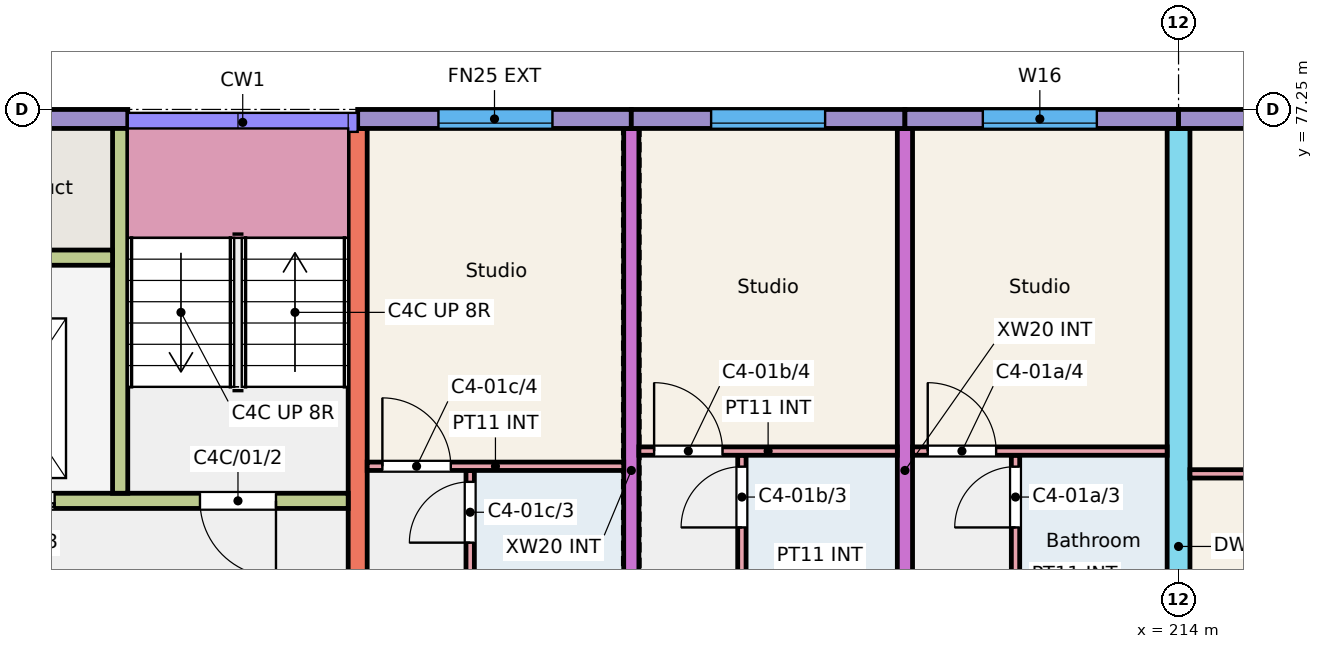
"""IFC4 building model, lengths in metres.
Left out: names, types, materials, properties, quantities, classifications, styles, units other than length and angle.
Written with IfcOpenShell. Run it as: python <this file> out.ifc"""

import sys

from ifc_helpers import new_model, si_unit, direction, frame, frame_2d, origin, place, context, subcontext, project, spatial, rectangle, extrude, element, fill, save


model = new_model("IFC4")
c1 = context("Model", 3, precision=1e-05, world=origin(), true_north=direction((0.0, 1.0)))
c2 = subcontext(c1, "Body", "Model", "MODEL_VIEW")
j1 = project(units=[si_unit("LENGTHUNIT", "METRE"), si_unit("PLANEANGLEUNIT", "RADIAN")], contexts=[c1])
p1 = place(None, origin())
s1 = spatial("IfcSite", under=j1, at=p1, CompositionType="ELEMENT")
p2 = place(p1, origin())
s2 = spatial("IfcBuilding", under=s1, at=p2, CompositionType="ELEMENT")
p3 = place(p2, frame((0.0, 0.0, 3.0)))
s3 = spatial("IfcBuildingStorey", under=s2, at=p3, CompositionType="ELEMENT", Elevation=3.0)
p4 = place(p3, frame((203.2, 68.0, 0.0), z_axis=(0.0, 0.0, 1.0), x_axis=(0.0, 1.0, 0.0)))
e1 = element("IfcWall", 1, at=p4, inside=s3, PredefinedType="SHEAR", context=c2, shape_type="SweptSolid", body=[
    extrude(rectangle(XDim=9.0, YDim=0.25, at=frame_2d((4.5, 0.0))), origin(), (0.0, 0.0, 1.0), 3.0),
])
for number, where, z_axis, x_axis in (
    (2, (206.8, 68.0, 0.0), (0.0, 0.0, 1.0), (0.0, 1.0, 0.0)),
    (3, (210.4, 68.0, 0.0), (0.0, 0.0, 1.0), (0.0, 1.0, 0.0)),
):
    element("IfcWall", number, at=place(p3, frame(where, z_axis=z_axis, x_axis=x_axis)), inside=s3, PredefinedType="SHEAR", context=c2, shape_type="SweptSolid", body=[
        extrude(rectangle(XDim=9.0, YDim=0.2, at=frame_2d((4.5, 0.0))), origin(), (0.0, 0.0, 1.0), 3.0),
    ])
p5 = place(p3, frame((214.0, 66.0, 0.0), z_axis=(0.0, 0.0, 1.0), x_axis=(0.0, 1.0, 0.0)))
e4 = element("IfcWall", 4, at=p5, inside=s3, PredefinedType="SHEAR", context=c2, shape_type="SweptSolid", body=[
    extrude(rectangle(XDim=11.0, YDim=0.3, at=frame_2d((5.5, 0.0))), origin(), (0.0, 0.0, 1.0), 3.0),
])
p6 = place(p5, frame((0.3, 0.0, 0.0)))
e5 = element("IfcOpeningElement", 5, at=p6, cuts=e4, PredefinedType="OPENING", context=c2, shape_type="SweptSolid", body=[
    extrude(rectangle(XDim=1.2, YDim=2.1, at=frame_2d((0.6, 1.05))), frame((0.0, 0.16, 0.0), z_axis=(0.0, -1.0, 0.0), x_axis=(1.0, 0.0, 0.0)), (0.0, 0.0, 1.0), 0.32),
])
p7 = place(p3, frame((197.2, 77.125, 0.0), z_axis=(0.0, 0.0, 1.0), x_axis=(1.0, 0.0, 0.0)))
e6 = element("IfcWall", 6, at=p7, inside=s3, PredefinedType="SOLIDWALL", context=c2, shape_type="SweptSolid", body=[
    extrude(rectangle(XDim=2.975, YDim=0.25, at=frame_2d((1.488, 0.0))), origin(), (0.0, 0.0, 1.0), 3.0),
])
p8 = place(p3, frame((197.35, 72.1, 0.0), z_axis=(0.0, 0.0, 1.0), x_axis=(1.0, 0.0, 0.0)))
e7 = element("IfcWall", 7, at=p8, inside=s3, PredefinedType="SHEAR", context=c2, shape_type="SweptSolid", body=[
    extrude(rectangle(XDim=5.725, YDim=0.2, at=frame_2d((2.862, 0.0))), origin(), (0.0, 0.0, 1.0), 3.0),
])
p9 = place(p8, frame((3.775, 0.0, 0.0)))
e8 = element("IfcOpeningElement", 8, at=p9, cuts=e7, PredefinedType="OPENING", context=c2, shape_type="SweptSolid", body=[
    extrude(rectangle(XDim=1.0, YDim=2.1, at=frame_2d((0.5, 1.05))), frame((0.0, 0.11, 0.0), z_axis=(0.0, -1.0, 0.0), x_axis=(1.0, 0.0, 0.0)), (0.0, 0.0, 1.0), 0.22),
])
p10 = place(p8, frame((0.762, 0.0, 0.0)))
e9 = element("IfcOpeningElement", 9, at=p10, cuts=e7, PredefinedType="OPENING", context=c2, shape_type="SweptSolid", body=[
    extrude(rectangle(XDim=1.1, YDim=2.1, at=frame_2d((0.55, 1.05))), frame((0.0, 0.11, 0.0), z_axis=(0.0, -1.0, 0.0), x_axis=(1.0, 0.0, 0.0)), (0.0, 0.0, 1.0), 0.22),
])
p11 = place(p3, frame((200.075, 72.2, 0.0), z_axis=(0.0, 0.0, 1.0), x_axis=(0.0, 1.0, 0.0)))
e10 = element("IfcWall", 10, at=p11, inside=s3, PredefinedType="SHEAR", context=c2, shape_type="SweptSolid", body=[
    extrude(rectangle(XDim=4.8, YDim=0.2, at=frame_2d((2.4, 0.0))), origin(), (0.0, 0.0, 1.0), 3.0),
])
p12 = place(p3, frame((197.35, 75.3, 0.0), z_axis=(0.0, 0.0, 1.0), x_axis=(1.0, 0.0, 0.0)))
e11 = element("IfcWall", 11, at=p12, inside=s3, PredefinedType="SHEAR", context=c2, shape_type="SweptSolid", body=[
    extrude(rectangle(XDim=2.625, YDim=0.2, at=frame_2d((1.312, 0.0))), origin(), (0.0, 0.0, 1.0), 3.0),
])
p13 = place(p3, frame((203.2, 77.125, 0.0), z_axis=(0.0, 0.0, 1.0), x_axis=(1.0, 0.0, 0.0)))
e12 = element("IfcWall", 12, at=p13, inside=s3, PredefinedType="SOLIDWALL", context=c2, shape_type="SweptSolid", body=[
    extrude(rectangle(XDim=3.6, YDim=0.25, at=frame_2d((1.8, 0.0))), origin(), (0.0, 0.0, 1.0), 3.0),
])
p14 = place(p13, frame((1.062, 0.0, 0.9)))
e13 = element("IfcOpeningElement", 13, at=p14, cuts=e12, PredefinedType="OPENING", context=c2, shape_type="SweptSolid", body=[
    extrude(rectangle(XDim=1.5, YDim=1.5, at=frame_2d((0.75, 0.75))), frame((0.0, 0.135, 0.0), z_axis=(0.0, -1.0, 0.0), x_axis=(1.0, 0.0, 0.0)), (0.0, 0.0, 1.0), 0.27),
])
p15 = place(p3, frame((206.8, 77.125, 0.0), z_axis=(0.0, 0.0, 1.0), x_axis=(1.0, 0.0, 0.0)))
e14 = element("IfcWall", 14, at=p15, inside=s3, PredefinedType="SOLIDWALL", context=c2, shape_type="SweptSolid", body=[
    extrude(rectangle(XDim=3.6, YDim=0.25, at=frame_2d((1.8, 0.0))), origin(), (0.0, 0.0, 1.0), 3.0),
])
p16 = place(p15, frame((1.05, 0.0, 0.9)))
e15 = element("IfcOpeningElement", 15, at=p16, cuts=e14, PredefinedType="OPENING", context=c2, shape_type="SweptSolid", body=[
    extrude(rectangle(XDim=1.5, YDim=1.5, at=frame_2d((0.75, 0.75))), frame((0.0, 0.135, 0.0), z_axis=(0.0, -1.0, 0.0), x_axis=(1.0, 0.0, 0.0)), (0.0, 0.0, 1.0), 0.27),
])
p17 = place(p3, frame((210.4, 77.125, 0.0), z_axis=(0.0, 0.0, 1.0), x_axis=(1.0, 0.0, 0.0)))
e16 = element("IfcWall", 16, at=p17, inside=s3, PredefinedType="SOLIDWALL", context=c2, shape_type="SweptSolid", body=[
    extrude(rectangle(XDim=3.6, YDim=0.25, at=frame_2d((1.8, 0.0))), origin(), (0.0, 0.0, 1.0), 3.0),
])
p18 = place(p17, frame((1.025, 0.0, 0.9)))
e17 = element("IfcOpeningElement", 17, at=p18, cuts=e16, PredefinedType="OPENING", context=c2, shape_type="SweptSolid", body=[
    extrude(rectangle(XDim=1.5, YDim=1.5, at=frame_2d((0.75, 0.75))), frame((0.0, 0.135, 0.0), z_axis=(0.0, -1.0, 0.0), x_axis=(1.0, 0.0, 0.0)), (0.0, 0.0, 1.0), 0.27),
])
p19 = place(p3, frame((214.0, 77.125, 0.0), z_axis=(0.0, 0.0, 1.0), x_axis=(1.0, 0.0, 0.0)))
e18 = element("IfcWall", 18, at=p19, inside=s3, PredefinedType="SOLIDWALL", context=c2, shape_type="SweptSolid", body=[
    extrude(rectangle(XDim=3.6, YDim=0.25, at=frame_2d((1.8, 0.0))), origin(), (0.0, 0.0, 1.0), 3.0),
])
p20 = place(p19, frame((1.062, 0.0, 0.9)))
e19 = element("IfcOpeningElement", 19, at=p20, cuts=e18, PredefinedType="OPENING", context=c2, shape_type="SweptSolid", body=[
    extrude(rectangle(XDim=1.5, YDim=1.5, at=frame_2d((0.75, 0.75))), frame((0.0, 0.135, 0.0), z_axis=(0.0, -1.0, 0.0), x_axis=(1.0, 0.0, 0.0)), (0.0, 0.0, 1.0), 0.27),
])
p21 = place(p3, frame((211.855, 68.0, 0.0), z_axis=(0.0, 0.0, 1.0), x_axis=(0.0, 1.0, 0.0)))
e20 = element("IfcWall", 20, at=p21, inside=s3, PredefinedType="PARTITIONING", context=c2, shape_type="SweptSolid", body=[
    extrude(rectangle(XDim=4.7, YDim=0.11, at=frame_2d((2.35, 0.0))), origin(), (0.0, 0.0, 1.0), 2.8),
])
p22 = place(p21, frame((0.2, 0.0, 0.0)))
e21 = element("IfcOpeningElement", 21, at=p22, cuts=e20, PredefinedType="OPENING", context=c2, shape_type="SweptSolid", body=[
    extrude(rectangle(XDim=0.8, YDim=2.1, at=frame_2d((0.4, 1.05))), frame((0.0, 0.065, 0.0), z_axis=(0.0, -1.0, 0.0), x_axis=(1.0, 0.0, 0.0)), (0.0, 0.0, 1.0), 0.13),
])
p23 = place(p21, frame((3.75, 0.0, 0.0)))
e22 = element("IfcOpeningElement", 22, at=p23, cuts=e20, PredefinedType="OPENING", context=c2, shape_type="SweptSolid", body=[
    extrude(rectangle(XDim=0.8, YDim=2.1, at=frame_2d((0.4, 1.05))), frame((0.0, 0.065, 0.0), z_axis=(0.0, -1.0, 0.0), x_axis=(1.0, 0.0, 0.0)), (0.0, 0.0, 1.0), 0.13),
])
p24 = place(p3, frame((210.5, 72.755, 0.0), z_axis=(0.0, 0.0, 1.0), x_axis=(1.0, 0.0, 0.0)))
e23 = element("IfcWall", 23, at=p24, inside=s3, PredefinedType="PARTITIONING", context=c2, shape_type="SweptSolid", body=[
    extrude(rectangle(XDim=3.35, YDim=0.11, at=frame_2d((1.675, 0.0))), origin(), (0.0, 0.0, 1.0), 2.8),
])
p25 = place(p24, frame((0.2, 0.0, 0.0)))
e24 = element("IfcOpeningElement", 24, at=p25, cuts=e23, PredefinedType="OPENING", context=c2, shape_type="SweptSolid", body=[
    extrude(rectangle(XDim=0.9, YDim=2.1, at=frame_2d((0.45, 1.05))), frame((0.0, 0.065, 0.0), z_axis=(0.0, -1.0, 0.0), x_axis=(1.0, 0.0, 0.0)), (0.0, 0.0, 1.0), 0.13),
])
p26 = place(p3, frame((208.255, 68.0, 0.0), z_axis=(0.0, 0.0, 1.0), x_axis=(0.0, 1.0, 0.0)))
e25 = element("IfcWall", 25, at=p26, inside=s3, PredefinedType="PARTITIONING", context=c2, shape_type="SweptSolid", body=[
    extrude(rectangle(XDim=4.7, YDim=0.11, at=frame_2d((2.35, 0.0))), origin(), (0.0, 0.0, 1.0), 2.8),
])
p27 = place(p26, frame((0.2, 0.0, 0.0)))
e26 = element("IfcOpeningElement", 26, at=p27, cuts=e25, PredefinedType="OPENING", context=c2, shape_type="SweptSolid", body=[
    extrude(rectangle(XDim=0.8, YDim=2.1, at=frame_2d((0.4, 1.05))), frame((0.0, 0.065, 0.0), z_axis=(0.0, -1.0, 0.0), x_axis=(1.0, 0.0, 0.0)), (0.0, 0.0, 1.0), 0.13),
])
p28 = place(p26, frame((3.75, 0.0, 0.0)))
e27 = element("IfcOpeningElement", 27, at=p28, cuts=e25, PredefinedType="OPENING", context=c2, shape_type="SweptSolid", body=[
    extrude(rectangle(XDim=0.8, YDim=2.1, at=frame_2d((0.4, 1.05))), frame((0.0, 0.065, 0.0), z_axis=(0.0, -1.0, 0.0), x_axis=(1.0, 0.0, 0.0)), (0.0, 0.0, 1.0), 0.13),
])
p29 = place(p3, frame((206.9, 72.755, 0.0), z_axis=(0.0, 0.0, 1.0), x_axis=(1.0, 0.0, 0.0)))
e28 = element("IfcWall", 28, at=p29, inside=s3, PredefinedType="PARTITIONING", context=c2, shape_type="SweptSolid", body=[
    extrude(rectangle(XDim=3.4, YDim=0.11, at=frame_2d((1.7, 0.0))), origin(), (0.0, 0.0, 1.0), 2.8),
])
p30 = place(p29, frame((0.2, 0.0, 0.0)))
e29 = element("IfcOpeningElement", 29, at=p30, cuts=e28, PredefinedType="OPENING", context=c2, shape_type="SweptSolid", body=[
    extrude(rectangle(XDim=0.9, YDim=2.1, at=frame_2d((0.45, 1.05))), frame((0.0, 0.065, 0.0), z_axis=(0.0, -1.0, 0.0), x_axis=(1.0, 0.0, 0.0)), (0.0, 0.0, 1.0), 0.13),
])
p31 = place(p3, frame((204.68, 68.0, 0.0), z_axis=(0.0, 0.0, 1.0), x_axis=(0.0, 1.0, 0.0)))
e30 = element("IfcWall", 30, at=p31, inside=s3, PredefinedType="PARTITIONING", context=c2, shape_type="SweptSolid", body=[
    extrude(rectangle(XDim=4.5, YDim=0.11, at=frame_2d((2.25, 0.0))), origin(), (0.0, 0.0, 1.0), 2.8),
])
p32 = place(p31, frame((0.2, 0.0, 0.0)))
e31 = element("IfcOpeningElement", 31, at=p32, cuts=e30, PredefinedType="OPENING", context=c2, shape_type="SweptSolid", body=[
    extrude(rectangle(XDim=0.8, YDim=2.1, at=frame_2d((0.4, 1.05))), frame((0.0, 0.065, 0.0), z_axis=(0.0, -1.0, 0.0), x_axis=(1.0, 0.0, 0.0)), (0.0, 0.0, 1.0), 0.13),
])
p33 = place(p31, frame((3.55, 0.0, 0.0)))
e32 = element("IfcOpeningElement", 32, at=p33, cuts=e30, PredefinedType="OPENING", context=c2, shape_type="SweptSolid", body=[
    extrude(rectangle(XDim=0.8, YDim=2.1, at=frame_2d((0.4, 1.05))), frame((0.0, 0.065, 0.0), z_axis=(0.0, -1.0, 0.0), x_axis=(1.0, 0.0, 0.0)), (0.0, 0.0, 1.0), 0.13),
])
p34 = place(p3, frame((203.325, 72.555, 0.0), z_axis=(0.0, 0.0, 1.0), x_axis=(1.0, 0.0, 0.0)))
e33 = element("IfcWall", 33, at=p34, inside=s3, PredefinedType="PARTITIONING", context=c2, shape_type="SweptSolid", body=[
    extrude(rectangle(XDim=3.375, YDim=0.11, at=frame_2d((1.688, 0.0))), origin(), (0.0, 0.0, 1.0), 2.8),
])
p35 = place(p34, frame((0.2, 0.0, 0.0)))
e34 = element("IfcOpeningElement", 34, at=p35, cuts=e33, PredefinedType="OPENING", context=c2, shape_type="SweptSolid", body=[
    extrude(rectangle(XDim=0.9, YDim=2.1, at=frame_2d((0.45, 1.05))), frame((0.0, 0.065, 0.0), z_axis=(0.0, -1.0, 0.0), x_axis=(1.0, 0.0, 0.0)), (0.0, 0.0, 1.0), 0.13),
])
p36 = place(p3, frame((214.15, 72.455, 0.0), z_axis=(0.0, 0.0, 1.0), x_axis=(1.0, 0.0, 0.0)))
e35 = element("IfcWall", 35, at=p36, inside=s3, PredefinedType="PARTITIONING", context=c2, shape_type="SweptSolid", body=[
    extrude(rectangle(XDim=3.325, YDim=0.11, at=frame_2d((1.663, 0.0))), origin(), (0.0, 0.0, 1.0), 2.8),
])
p37 = place(p18, origin())
e36 = element("IfcWindow", 36, at=p37, inside=s3, PartitioningType="SINGLE_PANEL", PredefinedType="WINDOW", context=c2, shape_type="SweptSolid", body=[
    extrude(rectangle(XDim=1.5, YDim=1.5, at=frame_2d((0.75, 0.75))), frame((0.0, -0.025, 0.0), z_axis=(0.0, -1.0, 0.0), x_axis=(1.0, 0.0, 0.0)), (0.0, 0.0, 1.0), 0.06),
])
fill(e17, e36)
p38 = place(p16, origin())
e37 = element("IfcWindow", 37, at=p38, inside=s3, PartitioningType="SINGLE_PANEL", PredefinedType="WINDOW", context=c2, shape_type="SweptSolid", body=[
    extrude(rectangle(XDim=1.5, YDim=1.5, at=frame_2d((0.75, 0.75))), frame((0.0, -0.025, 0.0), z_axis=(0.0, -1.0, 0.0), x_axis=(1.0, 0.0, 0.0)), (0.0, 0.0, 1.0), 0.06),
])
fill(e15, e37)
p39 = place(p14, origin())
e38 = element("IfcWindow", 38, at=p39, inside=s3, PartitioningType="SINGLE_PANEL", PredefinedType="WINDOW", context=c2, shape_type="SweptSolid", body=[
    extrude(rectangle(XDim=1.5, YDim=1.5, at=frame_2d((0.75, 0.75))), frame((0.0, -0.025, 0.0), z_axis=(0.0, -1.0, 0.0), x_axis=(1.0, 0.0, 0.0)), (0.0, 0.0, 1.0), 0.06),
])
fill(e13, e38)
p40 = place(p23, origin())
e39 = element("IfcDoor", 39, at=p40, inside=s3, OperationType="SINGLE_SWING_LEFT", PredefinedType="DOOR", context=c2, shape_type="SweptSolid", body=[
    extrude(rectangle(XDim=0.8, YDim=2.1, at=frame_2d((0.4, 1.05))), frame((0.0, 0.025, 0.0), z_axis=(0.0, -1.0, 0.0), x_axis=(1.0, 0.0, 0.0)), (0.0, 0.0, 1.0), 0.05),
])
fill(e22, e39)
p41 = place(p25, origin())
e40 = element("IfcDoor", 40, at=p41, inside=s3, OperationType="SINGLE_SWING_LEFT", PredefinedType="DOOR", context=c2, shape_type="SweptSolid", body=[
    extrude(rectangle(XDim=0.9, YDim=2.1, at=frame_2d((0.45, 1.05))), frame((0.0, 0.025, 0.0), z_axis=(0.0, -1.0, 0.0), x_axis=(1.0, 0.0, 0.0)), (0.0, 0.0, 1.0), 0.05),
])
fill(e24, e40)
p42 = place(p28, origin())
e41 = element("IfcDoor", 41, at=p42, inside=s3, OperationType="SINGLE_SWING_LEFT", PredefinedType="DOOR", context=c2, shape_type="SweptSolid", body=[
    extrude(rectangle(XDim=0.8, YDim=2.1, at=frame_2d((0.4, 1.05))), frame((0.0, 0.025, 0.0), z_axis=(0.0, -1.0, 0.0), x_axis=(1.0, 0.0, 0.0)), (0.0, 0.0, 1.0), 0.05),
])
fill(e27, e41)
p43 = place(p30, origin())
e42 = element("IfcDoor", 42, at=p43, inside=s3, OperationType="SINGLE_SWING_LEFT", PredefinedType="DOOR", context=c2, shape_type="SweptSolid", body=[
    extrude(rectangle(XDim=0.9, YDim=2.1, at=frame_2d((0.45, 1.05))), frame((0.0, 0.025, 0.0), z_axis=(0.0, -1.0, 0.0), x_axis=(1.0, 0.0, 0.0)), (0.0, 0.0, 1.0), 0.05),
])
fill(e29, e42)
p44 = place(p33, origin())
e43 = element("IfcDoor", 43, at=p44, inside=s3, OperationType="SINGLE_SWING_LEFT", PredefinedType="DOOR", context=c2, shape_type="SweptSolid", body=[
    extrude(rectangle(XDim=0.8, YDim=2.1, at=frame_2d((0.4, 1.05))), frame((0.0, 0.025, 0.0), z_axis=(0.0, -1.0, 0.0), x_axis=(1.0, 0.0, 0.0)), (0.0, 0.0, 1.0), 0.05),
])
fill(e32, e43)
p45 = place(p35, origin())
e44 = element("IfcDoor", 44, at=p45, inside=s3, OperationType="SINGLE_SWING_LEFT", PredefinedType="DOOR", context=c2, shape_type="SweptSolid", body=[
    extrude(rectangle(XDim=0.9, YDim=2.1, at=frame_2d((0.45, 1.05))), frame((0.0, 0.025, 0.0), z_axis=(0.0, -1.0, 0.0), x_axis=(1.0, 0.0, 0.0)), (0.0, 0.0, 1.0), 0.05),
])
fill(e34, e44)
p46 = place(p9, origin())
e45 = element("IfcDoor", 45, at=p46, inside=s3, OperationType="SINGLE_SWING_RIGHT", PredefinedType="DOOR", context=c2, shape_type="SweptSolid", body=[
    extrude(rectangle(XDim=1.0, YDim=2.1, at=frame_2d((0.5, 1.05))), frame((0.0, 0.025, 0.0), z_axis=(0.0, -1.0, 0.0), x_axis=(1.0, 0.0, 0.0)), (0.0, 0.0, 1.0), 0.05),
])
fill(e8, e45)
p47 = place(p10, origin())
e46 = element("IfcDoor", 46, at=p47, inside=s3, OperationType="DOUBLE_DOOR_SLIDING", PredefinedType="DOOR", context=c2, shape_type="SweptSolid", body=[
    extrude(rectangle(XDim=1.1, YDim=2.1, at=frame_2d((0.55, 1.05))), frame((0.0, 0.025, 0.0), z_axis=(0.0, -1.0, 0.0), x_axis=(1.0, 0.0, 0.0)), (0.0, 0.0, 1.0), 0.05),
])
fill(e9, e46)
save(model, sys.argv[1])
